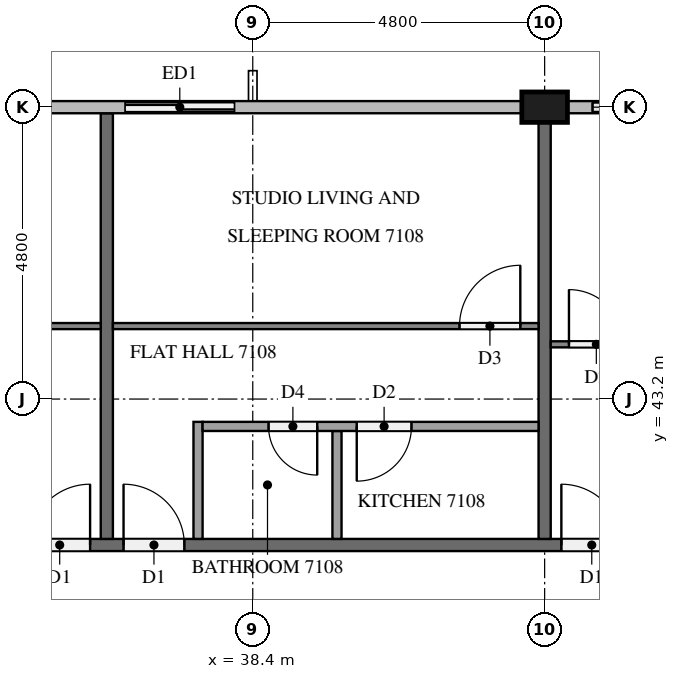
"""IFC4 building model, lengths in metres.
Left out: names, types, materials, properties, quantities, classifications, styles, units other than length and angle.
Written with IfcOpenShell. Run it as: python <this file> out.ifc"""

import sys

from ifc_helpers import new_model, si_unit, direction, frame, frame_2d, origin, origin_2d, place, context, subcontext, project, spatial, rectangle, extrude, element, fill, save


model = new_model("IFC4")
c1 = context("Model", 3, precision=1e-05, world=origin(), true_north=direction((0.0, 1.0)))
c2 = subcontext(c1, "Body", "Model", "MODEL_VIEW")
j1 = project(units=[si_unit("LENGTHUNIT", "METRE"), si_unit("PLANEANGLEUNIT", "RADIAN")], contexts=[c1])
p1 = place(None, origin())
s1 = spatial("IfcSite", under=j1, at=p1, CompositionType="ELEMENT")
p2 = place(p1, origin())
s2 = spatial("IfcBuilding", under=s1, at=p2, CompositionType="ELEMENT")
p3 = place(p2, frame((0.0, 0.0, 272.1)))
s3 = spatial("IfcBuildingStorey", under=s2, at=p3, CompositionType="ELEMENT", Elevation=272.1)
p4 = place(p3, frame((43.2, 48.0, 0.0), z_axis=(0.0, 0.0, 1.0), x_axis=(1.0, 0.0, 0.0)))
e1 = element("IfcColumn", 1, at=p4, inside=s3, PredefinedType="COLUMN", context=c2, shape_type="SweptSolid", body=[
    extrude(rectangle(XDim=0.75, YDim=0.5, at=origin_2d()), origin(), (0.0, 0.0, 1.0), 3.2),
])
p5 = place(p3, frame((45.6, 48.0, 0.0), z_axis=(0.0, 0.0, 1.0), x_axis=(-1.0, 0.0, 0.0)))
e2 = element("IfcWall", 2, at=p5, inside=s3, PredefinedType="SOLIDWALL", context=c2, shape_type="SweptSolid", body=[
    extrude(rectangle(XDim=2.025, YDim=0.15, at=frame_2d((1.013, 0.0))), origin(), (0.0, 0.0, 1.0), 3.2),
])
p6 = place(p5, frame((0.413, 0.0, 0.9)))
e3 = element("IfcOpeningElement", 3, at=p6, cuts=e2, PredefinedType="OPENING", context=c2, shape_type="SweptSolid", body=[
    extrude(rectangle(XDim=1.2, YDim=1.4, at=frame_2d((0.6, 0.7))), frame((0.0, 0.085, 0.0), z_axis=(0.0, -1.0, 0.0), x_axis=(1.0, 0.0, 0.0)), (0.0, 0.0, 1.0), 0.17),
])
p7 = place(p3, frame((38.4, 48.0, 0.0), z_axis=(0.0, 0.0, 1.0), x_axis=(-1.0, 0.0, 0.0)))
e4 = element("IfcWall", 4, at=p7, inside=s3, PredefinedType="SOLIDWALL", context=c2, shape_type="SweptSolid", body=[
    extrude(rectangle(XDim=2.4, YDim=0.15, at=frame_2d((1.2, 0.0))), origin(), (0.0, 0.0, 1.0), 3.2),
])
p8 = place(p7, frame((0.3, 0.0, 0.0)))
e5 = element("IfcOpeningElement", 5, at=p8, cuts=e4, PredefinedType="OPENING", context=c2, shape_type="SweptSolid", body=[
    extrude(rectangle(XDim=1.8, YDim=2.4, at=frame_2d((0.9, 1.2))), frame((0.0, 0.085, 0.0), z_axis=(0.0, -1.0, 0.0), x_axis=(1.0, 0.0, 0.0)), (0.0, 0.0, 1.0), 0.17),
])
p9 = place(p3, frame((11.9, 40.8, 0.0), z_axis=(0.0, 0.0, 1.0), x_axis=(1.0, 0.0, 0.0)))
e6 = element("IfcWall", 6, at=p9, inside=s3, PredefinedType="PARTITIONING", context=c2, shape_type="SweptSolid", body=[
    extrude(rectangle(XDim=38.6, YDim=0.2, at=frame_2d((19.3, 0.0))), origin(), (0.0, 0.0, 1.0), 3.2),
])
p10 = place(p9, frame((31.575, 0.0, 0.0)))
e7 = element("IfcOpeningElement", 7, at=p10, cuts=e6, PredefinedType="OPENING", context=c2, shape_type="SweptSolid", body=[
    extrude(rectangle(XDim=1.0, YDim=2.1, at=frame_2d((0.5, 1.05))), frame((0.0, 0.11, 0.0), z_axis=(0.0, -1.0, 0.0), x_axis=(1.0, 0.0, 0.0)), (0.0, 0.0, 1.0), 0.22),
])
p11 = place(p9, frame((24.375, 0.0, 0.0)))
e8 = element("IfcOpeningElement", 8, at=p11, cuts=e6, PredefinedType="OPENING", context=c2, shape_type="SweptSolid", body=[
    extrude(rectangle(XDim=1.0, YDim=2.1, at=frame_2d((0.5, 1.05))), frame((0.0, 0.11, 0.0), z_axis=(0.0, -1.0, 0.0), x_axis=(1.0, 0.0, 0.0)), (0.0, 0.0, 1.0), 0.22),
])
p12 = place(p9, frame((22.825, 0.0, 0.0)))
e9 = element("IfcOpeningElement", 9, at=p12, cuts=e6, PredefinedType="OPENING", context=c2, shape_type="SweptSolid", body=[
    extrude(rectangle(XDim=1.0, YDim=2.1, at=frame_2d((0.5, 1.05))), frame((0.0, 0.11, 0.0), z_axis=(0.0, -1.0, 0.0), x_axis=(1.0, 0.0, 0.0)), (0.0, 0.0, 1.0), 0.22),
])
p13 = place(p9, frame((0.375, 0.0, 0.0)))
e10 = element("IfcOpeningElement", 10, at=p13, cuts=e6, PredefinedType="OPENING", context=c2, shape_type="SweptSolid", body=[
    extrude(rectangle(XDim=1.0, YDim=2.1, at=frame_2d((0.5, 1.05))), frame((0.0, 0.11, 0.0), z_axis=(0.0, -1.0, 0.0), x_axis=(1.0, 0.0, 0.0)), (0.0, 0.0, 1.0), 0.22),
])
p14 = place(p3, frame((43.2, 47.75, 0.0), z_axis=(0.0, 0.0, 1.0), x_axis=(0.0, -1.0, 0.0)))
e11 = element("IfcWall", 11, at=p14, inside=s3, PredefinedType="PARTITIONING", context=c2, shape_type="SweptSolid", body=[
    extrude(rectangle(XDim=6.85, YDim=0.2, at=frame_2d((3.425, 0.0))), origin(), (0.0, 0.0, 1.0), 3.2),
])
p15 = place(p3, frame((36.0, 47.9, 0.0), z_axis=(0.0, 0.0, 1.0), x_axis=(0.0, -1.0, 0.0)))
e12 = element("IfcWall", 12, at=p15, inside=s3, PredefinedType="PARTITIONING", context=c2, shape_type="SweptSolid", body=[
    extrude(rectangle(XDim=7.0, YDim=0.2, at=frame_2d((3.5, 0.0))), origin(), (0.0, 0.0, 1.0), 3.2),
])
p16 = place(p3, frame((43.3, 44.1, 0.0), z_axis=(0.0, 0.0, 1.0), x_axis=(1.0, 0.0, 0.0)))
e13 = element("IfcWall", 13, at=p16, inside=s3, PredefinedType="PARTITIONING", context=c2, shape_type="SweptSolid", body=[
    extrude(rectangle(XDim=13.959, YDim=0.1, at=frame_2d((6.979, 0.0))), origin(), (0.0, 0.0, 1.0), 3.2),
])
p17 = place(p16, frame((0.3, 0.0, 0.0)))
e14 = element("IfcOpeningElement", 14, at=p17, cuts=e13, PredefinedType="OPENING", context=c2, shape_type="SweptSolid", body=[
    extrude(rectangle(XDim=0.9, YDim=2.1, at=frame_2d((0.45, 1.05))), frame((0.0, 0.06, 0.0), z_axis=(0.0, -1.0, 0.0), x_axis=(1.0, 0.0, 0.0)), (0.0, 0.0, 1.0), 0.12),
])
p18 = place(p16, frame((8.25, 0.0, 0.0)))
e15 = element("IfcOpeningElement", 15, at=p18, cuts=e13, PredefinedType="OPENING", context=c2, shape_type="SweptSolid", body=[
    extrude(rectangle(XDim=0.9, YDim=2.1, at=frame_2d((0.45, 1.05))), frame((0.0, 0.06, 0.0), z_axis=(0.0, -1.0, 0.0), x_axis=(1.0, 0.0, 0.0)), (0.0, 0.0, 1.0), 0.12),
])
p19 = place(p16, frame((9.85, 0.0, 0.0)))
e16 = element("IfcOpeningElement", 16, at=p19, cuts=e13, PredefinedType="OPENING", context=c2, shape_type="SweptSolid", body=[
    extrude(rectangle(XDim=1.0, YDim=2.1, at=frame_2d((0.5, 1.05))), frame((0.0, 0.06, 0.0), z_axis=(0.0, -1.0, 0.0), x_axis=(1.0, 0.0, 0.0)), (0.0, 0.0, 1.0), 0.12),
])
p20 = place(p3, frame((36.1, 44.4, 0.0), z_axis=(0.0, 0.0, 1.0), x_axis=(1.0, 0.0, 0.0)))
e17 = element("IfcWall", 17, at=p20, inside=s3, PredefinedType="PARTITIONING", context=c2, shape_type="SweptSolid", body=[
    extrude(rectangle(XDim=7.0, YDim=0.1, at=frame_2d((3.5, 0.0))), origin(), (0.0, 0.0, 1.0), 3.2),
])
p21 = place(p20, frame((5.7, 0.0, 0.0)))
e18 = element("IfcOpeningElement", 18, at=p21, cuts=e17, PredefinedType="OPENING", context=c2, shape_type="SweptSolid", body=[
    extrude(rectangle(XDim=1.0, YDim=2.1, at=frame_2d((0.5, 1.05))), frame((0.0, 0.06, 0.0), z_axis=(0.0, -1.0, 0.0), x_axis=(1.0, 0.0, 0.0)), (0.0, 0.0, 1.0), 0.12),
])
p22 = place(p3, frame((39.785, 40.9, 0.0), z_axis=(0.0, 0.0, 1.0), x_axis=(0.0, 1.0, 0.0)))
e19 = element("IfcWall", 19, at=p22, inside=s3, PredefinedType="PARTITIONING", context=c2, shape_type="SweptSolid", body=[
    extrude(rectangle(XDim=1.775, YDim=0.15, at=frame_2d((0.888, 0.0))), origin(), (0.0, 0.0, 1.0), 3.2),
])
p23 = place(p3, frame((37.5, 40.9, 0.0), z_axis=(0.0, 0.0, 1.0), x_axis=(0.0, 1.0, 0.0)))
e20 = element("IfcWall", 20, at=p23, inside=s3, PredefinedType="PARTITIONING", context=c2, shape_type="SweptSolid", body=[
    extrude(rectangle(XDim=1.925, YDim=0.15, at=frame_2d((0.962, 0.0))), origin(), (0.0, 0.0, 1.0), 3.2),
])
p24 = place(p3, frame((43.1, 42.75, 0.0), z_axis=(0.0, 0.0, 1.0), x_axis=(-1.0, 0.0, 0.0)))
e21 = element("IfcWall", 21, at=p24, inside=s3, PredefinedType="PARTITIONING", context=c2, shape_type="SweptSolid", body=[
    extrude(rectangle(XDim=5.525, YDim=0.15, at=frame_2d((2.763, 0.0))), origin(), (0.0, 0.0, 1.0), 3.2),
])
p25 = place(p24, frame((3.64, 0.0, 0.0)))
e22 = element("IfcOpeningElement", 22, at=p25, cuts=e21, PredefinedType="OPENING", context=c2, shape_type="SweptSolid", body=[
    extrude(rectangle(XDim=0.8, YDim=2.1, at=frame_2d((0.4, 1.05))), frame((0.0, 0.085, 0.0), z_axis=(0.0, -1.0, 0.0), x_axis=(1.0, 0.0, 0.0)), (0.0, 0.0, 1.0), 0.17),
])
p26 = place(p24, frame((2.09, 0.0, 0.0)))
e23 = element("IfcOpeningElement", 23, at=p26, cuts=e21, PredefinedType="OPENING", context=c2, shape_type="SweptSolid", body=[
    extrude(rectangle(XDim=0.9, YDim=2.1, at=frame_2d((0.45, 1.05))), frame((0.0, 0.085, 0.0), z_axis=(0.0, -1.0, 0.0), x_axis=(1.0, 0.0, 0.0)), (0.0, 0.0, 1.0), 0.17),
])
p27 = place(p3, frame((21.7, 44.4, 0.0), z_axis=(0.0, 0.0, 1.0), x_axis=(1.0, 0.0, 0.0)))
e24 = element("IfcWall", 24, at=p27, inside=s3, PredefinedType="PARTITIONING", context=c2, shape_type="SweptSolid", body=[
    extrude(rectangle(XDim=14.2, YDim=0.1, at=frame_2d((7.1, 0.0))), origin(), (0.0, 0.0, 1.0), 3.2),
])
p28 = place(p27, frame((9.85, 0.0, 0.0)))
e25 = element("IfcOpeningElement", 25, at=p28, cuts=e24, PredefinedType="OPENING", context=c2, shape_type="SweptSolid", body=[
    extrude(rectangle(XDim=0.9, YDim=2.1, at=frame_2d((0.45, 1.05))), frame((0.0, 0.06, 0.0), z_axis=(0.0, -1.0, 0.0), x_axis=(1.0, 0.0, 0.0)), (0.0, 0.0, 1.0), 0.12),
])
p29 = place(p27, frame((8.25, 0.0, 0.0)))
e26 = element("IfcOpeningElement", 26, at=p29, cuts=e24, PredefinedType="OPENING", context=c2, shape_type="SweptSolid", body=[
    extrude(rectangle(XDim=0.9, YDim=2.1, at=frame_2d((0.45, 1.05))), frame((0.0, 0.06, 0.0), z_axis=(0.0, -1.0, 0.0), x_axis=(1.0, 0.0, 0.0)), (0.0, 0.0, 1.0), 0.12),
])
p30 = place(p27, frame((0.3, 0.0, 0.0)))
e27 = element("IfcOpeningElement", 27, at=p30, cuts=e24, PredefinedType="OPENING", context=c2, shape_type="SweptSolid", body=[
    extrude(rectangle(XDim=1.0, YDim=2.1, at=frame_2d((0.5, 1.05))), frame((0.0, 0.06, 0.0), z_axis=(0.0, -1.0, 0.0), x_axis=(1.0, 0.0, 0.0)), (0.0, 0.0, 1.0), 0.12),
])
p31 = place(p6, origin())
e28 = element("IfcWindow", 28, at=p31, inside=s3, PartitioningType="SINGLE_PANEL", PredefinedType="WINDOW", context=c2, shape_type="SweptSolid", body=[
    extrude(rectangle(XDim=1.2, YDim=1.4, at=frame_2d((0.6, 0.7))), frame((0.0, 0.03, 0.0), z_axis=(0.0, -1.0, 0.0), x_axis=(1.0, 0.0, 0.0)), (0.0, 0.0, 1.0), 0.06),
])
fill(e3, e28)
p32 = place(p8, origin())
e29 = element("IfcDoor", 29, at=p32, inside=s3, OperationType="SLIDING_TO_RIGHT", PredefinedType="DOOR", context=c2, shape_type="SweptSolid", body=[
    extrude(rectangle(XDim=1.8, YDim=2.4, at=frame_2d((0.9, 1.2))), frame((0.0, 0.025, 0.0), z_axis=(0.0, -1.0, 0.0), x_axis=(1.0, 0.0, 0.0)), (0.0, 0.0, 1.0), 0.05),
])
fill(e5, e29)
p33 = place(p10, origin())
e30 = element("IfcDoor", 30, at=p33, inside=s3, OperationType="SINGLE_SWING_LEFT", PredefinedType="DOOR", context=c2, shape_type="SweptSolid", body=[
    extrude(rectangle(XDim=1.0, YDim=2.1, at=frame_2d((0.5, 1.05))), frame((0.0, 0.025, 0.0), z_axis=(0.0, -1.0, 0.0), x_axis=(1.0, 0.0, 0.0)), (0.0, 0.0, 1.0), 0.05),
])
fill(e7, e30)
p34 = place(p11, origin())
e31 = element("IfcDoor", 31, at=p34, inside=s3, OperationType="SINGLE_SWING_LEFT", PredefinedType="DOOR", context=c2, shape_type="SweptSolid", body=[
    extrude(rectangle(XDim=1.0, YDim=2.1, at=frame_2d((0.5, 1.05))), frame((0.0, 0.025, 0.0), z_axis=(0.0, -1.0, 0.0), x_axis=(1.0, 0.0, 0.0)), (0.0, 0.0, 1.0), 0.05),
])
fill(e8, e31)
p35 = place(p12, origin())
e32 = element("IfcDoor", 32, at=p35, inside=s3, OperationType="SINGLE_SWING_RIGHT", PredefinedType="DOOR", context=c2, shape_type="SweptSolid", body=[
    extrude(rectangle(XDim=1.0, YDim=2.1, at=frame_2d((0.5, 1.05))), frame((0.0, 0.025, 0.0), z_axis=(0.0, -1.0, 0.0), x_axis=(1.0, 0.0, 0.0)), (0.0, 0.0, 1.0), 0.05),
])
fill(e9, e32)
p36 = place(p17, origin())
e33 = element("IfcDoor", 33, at=p36, inside=s3, OperationType="SINGLE_SWING_LEFT", PredefinedType="DOOR", context=c2, shape_type="SweptSolid", body=[
    extrude(rectangle(XDim=0.9, YDim=2.1, at=frame_2d((0.45, 1.05))), frame((0.0, 0.025, 0.0), z_axis=(0.0, -1.0, 0.0), x_axis=(1.0, 0.0, 0.0)), (0.0, 0.0, 1.0), 0.05),
])
fill(e14, e33)
p37 = place(p21, origin())
e34 = element("IfcDoor", 34, at=p37, inside=s3, OperationType="SINGLE_SWING_RIGHT", PredefinedType="DOOR", context=c2, shape_type="SweptSolid", body=[
    extrude(rectangle(XDim=1.0, YDim=2.1, at=frame_2d((0.5, 1.05))), frame((0.0, 0.025, 0.0), z_axis=(0.0, -1.0, 0.0), x_axis=(1.0, 0.0, 0.0)), (0.0, 0.0, 1.0), 0.05),
])
fill(e18, e34)
p38 = place(p25, origin())
e35 = element("IfcDoor", 35, at=p38, inside=s3, OperationType="SINGLE_SWING_LEFT", PredefinedType="DOOR", context=c2, shape_type="SweptSolid", body=[
    extrude(rectangle(XDim=0.8, YDim=2.1, at=frame_2d((0.4, 1.05))), frame((0.0, 0.025, 0.0), z_axis=(0.0, -1.0, 0.0), x_axis=(1.0, 0.0, 0.0)), (0.0, 0.0, 1.0), 0.05),
])
fill(e22, e35)
p39 = place(p26, origin())
e36 = element("IfcDoor", 36, at=p39, inside=s3, OperationType="SINGLE_SWING_RIGHT", PredefinedType="DOOR", context=c2, shape_type="SweptSolid", body=[
    extrude(rectangle(XDim=0.9, YDim=2.1, at=frame_2d((0.45, 1.05))), frame((0.0, 0.025, 0.0), z_axis=(0.0, -1.0, 0.0), x_axis=(1.0, 0.0, 0.0)), (0.0, 0.0, 1.0), 0.05),
])
fill(e23, e36)
save(model, sys.argv[1])
